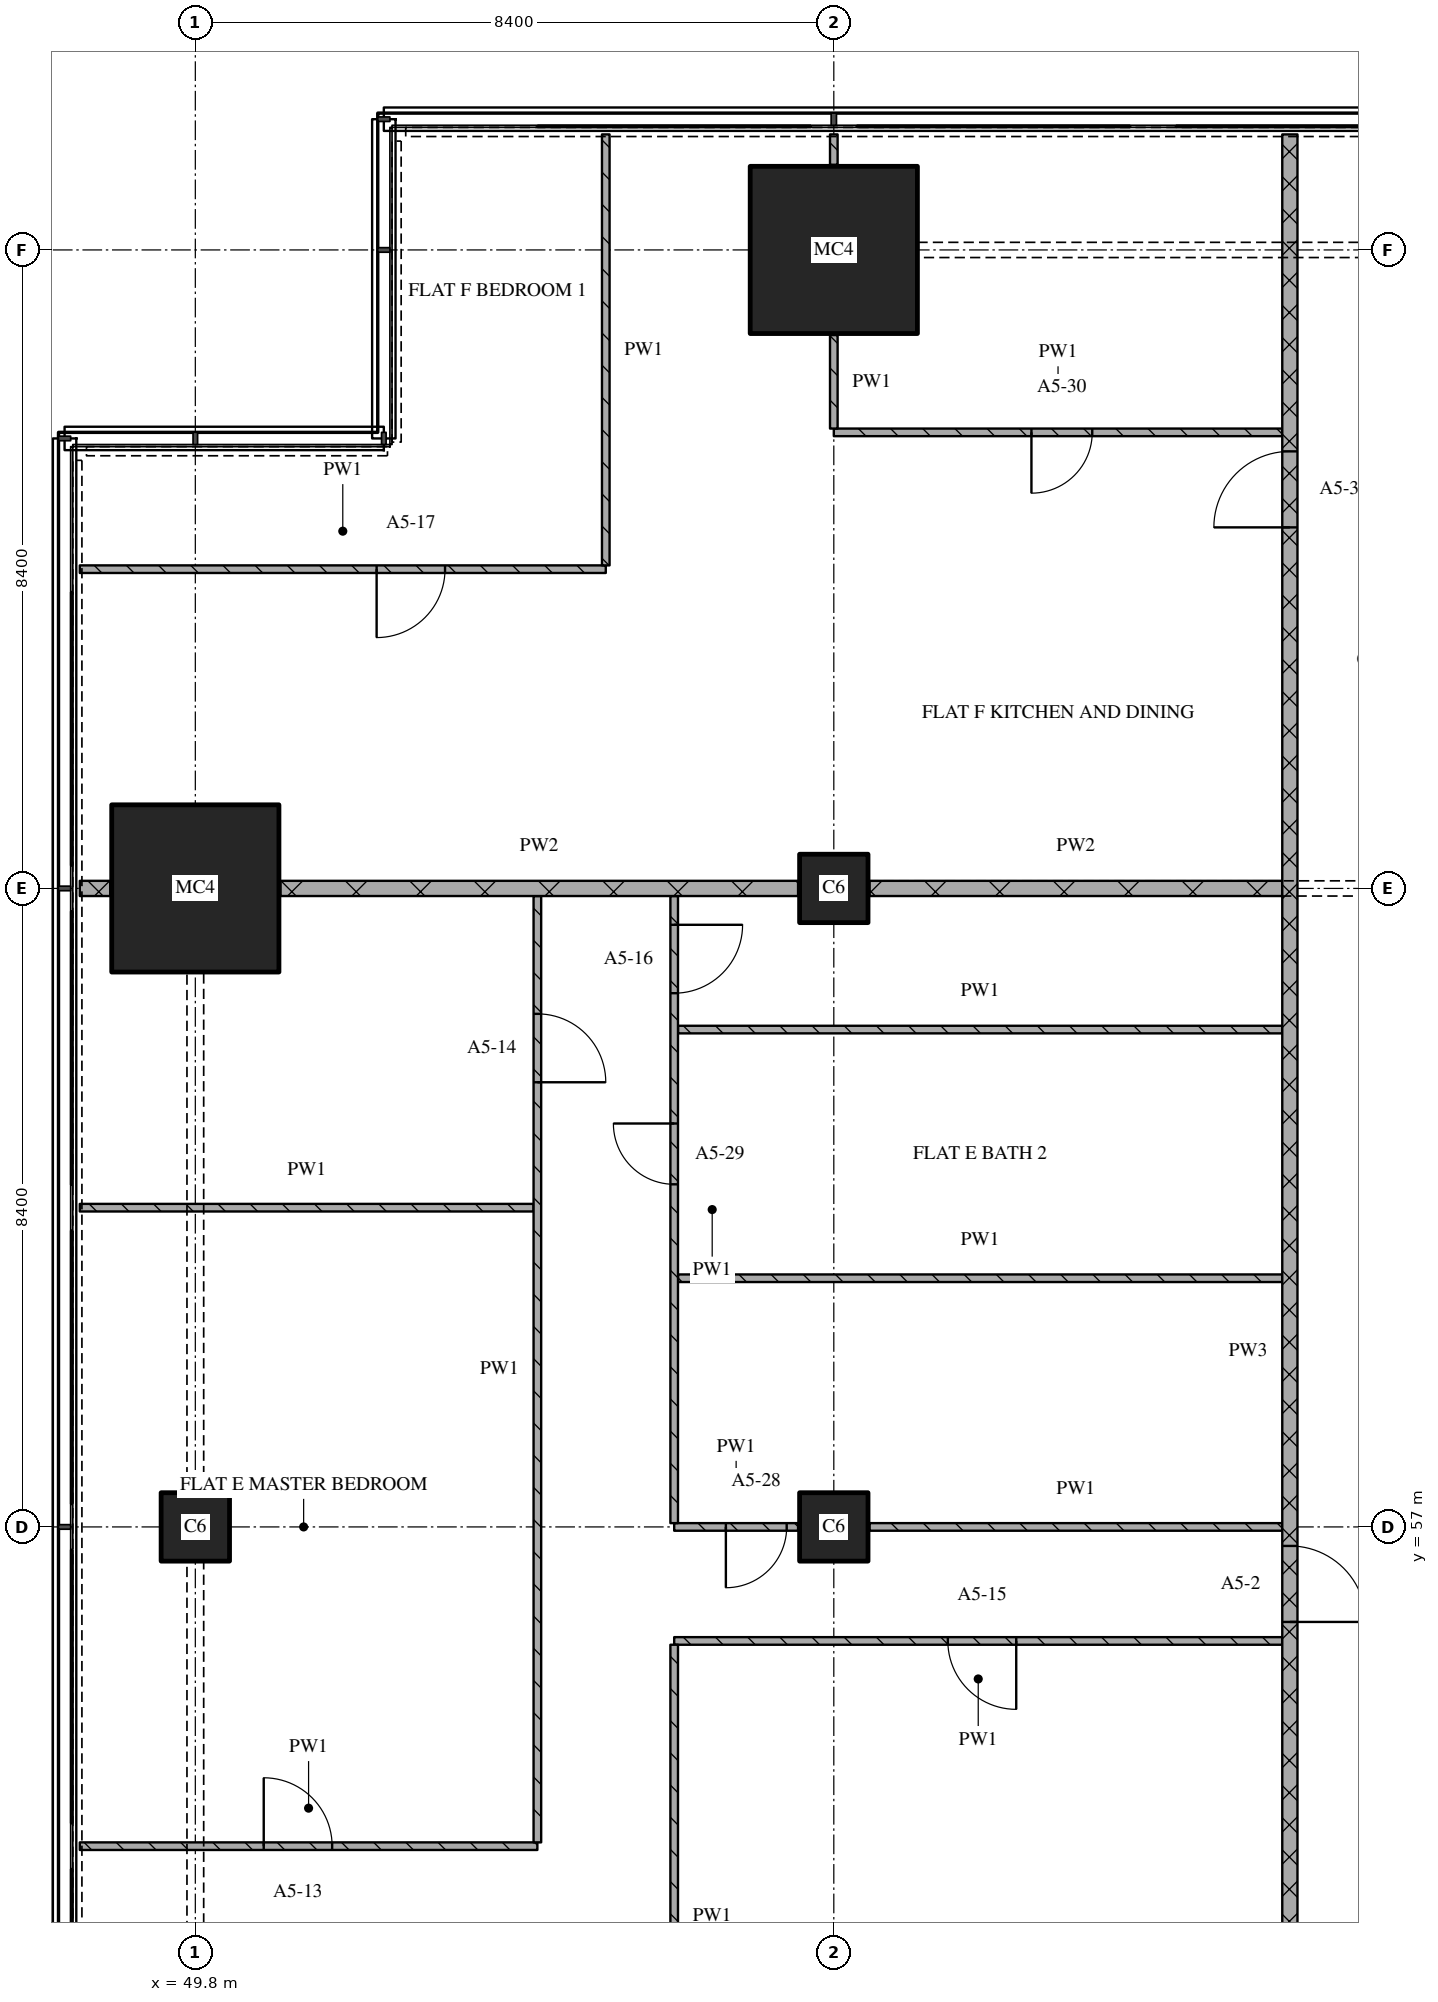
"""IFC4 building model, lengths in metres.
Left out: names, types, materials, properties, quantities, classifications, styles, units other than length and angle.
Written with IfcOpenShell. Run it as: python <this file> out.ifc"""

import sys

from ifc_helpers import new_model, si_unit, direction, frame, frame_2d, origin, origin_2d, place, context, subcontext, project, spatial, rectangle, extrude, element, fill, save


model = new_model("IFC4")
c1 = context("Model", 3, precision=1e-05, world=origin(), true_north=direction((0.0, 1.0)))
c2 = subcontext(c1, "Body", "Model", "MODEL_VIEW")
j1 = project(units=[si_unit("LENGTHUNIT", "METRE"), si_unit("PLANEANGLEUNIT", "RADIAN")], contexts=[c1])
p1 = place(None, origin())
s1 = spatial("IfcSite", under=j1, at=p1, CompositionType="ELEMENT")
p2 = place(p1, origin())
s2 = spatial("IfcBuilding", under=s1, at=p2, CompositionType="ELEMENT")
p3 = place(p2, frame((0.0, 0.0, 80.4)))
s3 = spatial("IfcBuildingStorey", under=s2, at=p3, CompositionType="ELEMENT", Elevation=80.4)
p4 = place(p3, frame((49.8, 57.0, 0.0), z_axis=(0.0, 0.0, 1.0), x_axis=(1.0, 0.0, 0.0)))
e1 = element("IfcColumn", 1, at=p4, inside=s3, PredefinedType="COLUMN", context=c2, shape_type="SweptSolid", body=[
    extrude(rectangle(XDim=0.9, YDim=0.9, at=origin_2d()), origin(), (0.0, 0.0, 1.0), 3.6),
])
p5 = place(p3, frame((49.8, 65.4, 0.0), z_axis=(0.0, 0.0, 1.0), x_axis=(1.0, 0.0, 0.0)))
e2 = element("IfcColumn", 2, at=p5, inside=s3, PredefinedType="COLUMN", context=c2, shape_type="SweptSolid", body=[
    extrude(rectangle(XDim=2.2, YDim=2.2, at=origin_2d()), origin(), (0.0, 0.0, 1.0), 3.6),
])
for number, where, z_axis, x_axis in (
    (3, (58.2, 57.0, 0.0), (0.0, 0.0, 1.0), (1.0, 0.0, 0.0)),
    (4, (58.2, 65.4, 0.0), (0.0, 0.0, 1.0), (1.0, 0.0, 0.0)),
):
    element("IfcColumn", number, at=place(p3, frame(where, z_axis=z_axis, x_axis=x_axis)), inside=s3, PredefinedType="COLUMN", context=c2, shape_type="SweptSolid", body=[
        extrude(rectangle(XDim=0.9, YDim=0.9, at=origin_2d()), origin(), (0.0, 0.0, 1.0), 3.6),
    ])
p6 = place(p3, frame((58.2, 73.8, 0.0), z_axis=(0.0, 0.0, 1.0), x_axis=(1.0, 0.0, 0.0)))
e5 = element("IfcColumn", 5, at=p6, inside=s3, PredefinedType="COLUMN", context=c2, shape_type="SweptSolid", body=[
    extrude(rectangle(XDim=2.2, YDim=2.2, at=origin_2d()), origin(), (0.0, 0.0, 1.0), 3.6),
])
p7 = place(p3, frame((48.28, 52.8, 0.0), z_axis=(0.0, 0.0, 1.0), x_axis=(1.0, 0.0, 0.0)))
e6 = element("IfcWall", 6, at=p7, inside=s3, PredefinedType="PARTITIONING", context=c2, shape_type="SweptSolid", body=[
    extrude(rectangle(XDim=6.02, YDim=0.1, at=frame_2d((3.01, 0.0))), origin(), (0.0, 0.0, 1.0), 3.3),
])
p8 = place(p7, frame((2.42, 0.0, 0.0)))
e7 = element("IfcOpeningElement", 7, at=p8, cuts=e6, PredefinedType="OPENING", context=c2, shape_type="SweptSolid", body=[
    extrude(rectangle(XDim=0.9, YDim=2.1, at=frame_2d((0.45, 1.05))), frame((0.0, 0.06, 0.0), z_axis=(0.0, -1.0, 0.0), x_axis=(1.0, 0.0, 0.0)), (0.0, 0.0, 1.0), 0.12),
])
p9 = place(p3, frame((64.1, 55.5, 0.0), z_axis=(0.0, 0.0, 1.0), x_axis=(-1.0, 0.0, 0.0)))
e8 = element("IfcWall", 8, at=p9, inside=s3, PredefinedType="PARTITIONING", context=c2, shape_type="SweptSolid", body=[
    extrude(rectangle(XDim=8.0, YDim=0.1, at=frame_2d((4.0, 0.0))), origin(), (0.0, 0.0, 1.0), 3.3),
])
p10 = place(p9, frame((3.5, 0.0, 0.0)))
e9 = element("IfcOpeningElement", 9, at=p10, cuts=e8, PredefinedType="OPENING", context=c2, shape_type="SweptSolid", body=[
    extrude(rectangle(XDim=0.9, YDim=2.1, at=frame_2d((0.45, 1.05))), frame((0.0, 0.06, 0.0), z_axis=(0.0, -1.0, 0.0), x_axis=(1.0, 0.0, 0.0)), (0.0, 0.0, 1.0), 0.12),
])
p11 = place(p3, frame((56.1, 57.0, 0.0), z_axis=(0.0, 0.0, 1.0), x_axis=(1.0, 0.0, 0.0)))
e10 = element("IfcWall", 10, at=p11, inside=s3, PredefinedType="PARTITIONING", context=c2, shape_type="SweptSolid", body=[
    extrude(rectangle(XDim=1.63, YDim=0.1, at=frame_2d((0.815, 0.0))), origin(), (0.0, 0.0, 1.0), 3.3),
])
p12 = place(p11, frame((0.68, 0.0, 0.0)))
e11 = element("IfcOpeningElement", 11, at=p12, cuts=e10, PredefinedType="OPENING", context=c2, shape_type="SweptSolid", body=[
    extrude(rectangle(XDim=0.8, YDim=2.1, at=frame_2d((0.4, 1.05))), frame((0.0, 0.06, 0.0), z_axis=(0.0, -1.0, 0.0), x_axis=(1.0, 0.0, 0.0)), (0.0, 0.0, 1.0), 0.12),
])
p13 = place(p3, frame((58.67, 57.0, 0.0), z_axis=(0.0, 0.0, 1.0), x_axis=(1.0, 0.0, 0.0)))
e12 = element("IfcWall", 12, at=p13, inside=s3, PredefinedType="PARTITIONING", context=c2, shape_type="SweptSolid", body=[
    extrude(rectangle(XDim=5.43, YDim=0.1, at=frame_2d((2.715, 0.0))), origin(), (0.0, 0.0, 1.0), 3.3),
])
p14 = place(p3, frame((56.15, 60.271, 0.0), z_axis=(0.0, 0.0, 1.0), x_axis=(1.0, 0.0, 0.0)))
e13 = element("IfcWall", 13, at=p14, inside=s3, PredefinedType="PARTITIONING", context=c2, shape_type="SweptSolid", body=[
    extrude(rectangle(XDim=7.95, YDim=0.1, at=frame_2d((3.975, 0.0))), origin(), (0.0, 0.0, 1.0), 3.3),
])
p15 = place(p3, frame((48.28, 61.2, 0.0), z_axis=(0.0, 0.0, 1.0), x_axis=(1.0, 0.0, 0.0)))
e14 = element("IfcWall", 14, at=p15, inside=s3, PredefinedType="PARTITIONING", context=c2, shape_type="SweptSolid", body=[
    extrude(rectangle(XDim=5.97, YDim=0.1, at=frame_2d((2.985, 0.0))), origin(), (0.0, 0.0, 1.0), 3.3),
])
p16 = place(p3, frame((56.15, 63.543, 0.0), z_axis=(0.0, 0.0, 1.0), x_axis=(1.0, 0.0, 0.0)))
e15 = element("IfcWall", 15, at=p16, inside=s3, PredefinedType="PARTITIONING", context=c2, shape_type="SweptSolid", body=[
    extrude(rectangle(XDim=7.95, YDim=0.1, at=frame_2d((3.975, 0.0))), origin(), (0.0, 0.0, 1.0), 3.3),
])
p17 = place(p3, frame((48.28, 65.4, 0.0), z_axis=(0.0, 0.0, 1.0), x_axis=(1.0, 0.0, 0.0)))
e16 = element("IfcWall", 16, at=p17, inside=s3, PredefinedType="PARTITIONING", context=c2, shape_type="SweptSolid", body=[
    extrude(rectangle(XDim=0.4, YDim=0.2, at=frame_2d((0.2, 0.0))), origin(), (0.0, 0.0, 1.0), 3.3),
])
p18 = place(p3, frame((50.92, 65.4, 0.0), z_axis=(0.0, 0.0, 1.0), x_axis=(1.0, 0.0, 0.0)))
e17 = element("IfcWall", 17, at=p18, inside=s3, PredefinedType="PARTITIONING", context=c2, shape_type="SweptSolid", body=[
    extrude(rectangle(XDim=6.81, YDim=0.2, at=frame_2d((3.405, 0.0))), origin(), (0.0, 0.0, 1.0), 2.41),
])
p19 = place(p3, frame((58.67, 65.4, 0.0), z_axis=(0.0, 0.0, 1.0), x_axis=(1.0, 0.0, 0.0)))
e18 = element("IfcWall", 18, at=p19, inside=s3, PredefinedType="PARTITIONING", context=c2, shape_type="SweptSolid", body=[
    extrude(rectangle(XDim=5.43, YDim=0.2, at=frame_2d((2.715, 0.0))), origin(), (0.0, 0.0, 1.0), 2.8),
])
p20 = place(p3, frame((48.28, 69.6, 0.0), z_axis=(0.0, 0.0, 1.0), x_axis=(1.0, 0.0, 0.0)))
e19 = element("IfcWall", 19, at=p20, inside=s3, PredefinedType="PARTITIONING", context=c2, shape_type="SweptSolid", body=[
    extrude(rectangle(XDim=6.92, YDim=0.1, at=frame_2d((3.46, 0.0))), origin(), (0.0, 0.0, 1.0), 3.3),
])
p21 = place(p20, frame((3.905, 0.0, 0.0)))
e20 = element("IfcOpeningElement", 20, at=p21, cuts=e19, PredefinedType="OPENING", context=c2, shape_type="SweptSolid", body=[
    extrude(rectangle(XDim=0.9, YDim=2.1, at=frame_2d((0.45, 1.05))), frame((0.0, 0.06, 0.0), z_axis=(0.0, -1.0, 0.0), x_axis=(1.0, 0.0, 0.0)), (0.0, 0.0, 1.0), 0.12),
])
p22 = place(p3, frame((58.2, 71.4, 0.0), z_axis=(0.0, 0.0, 1.0), x_axis=(1.0, 0.0, 0.0)))
e21 = element("IfcWall", 21, at=p22, inside=s3, PredefinedType="PARTITIONING", context=c2, shape_type="SweptSolid", body=[
    extrude(rectangle(XDim=5.9, YDim=0.1, at=frame_2d((2.95, 0.0))), origin(), (0.0, 0.0, 1.0), 3.3),
])
p23 = place(p22, frame((2.6, 0.0, 0.0)))
e22 = element("IfcOpeningElement", 22, at=p23, cuts=e21, PredefinedType="OPENING", context=c2, shape_type="SweptSolid", body=[
    extrude(rectangle(XDim=0.8, YDim=2.1, at=frame_2d((0.4, 1.05))), frame((0.0, 0.06, 0.0), z_axis=(0.0, -1.0, 0.0), x_axis=(1.0, 0.0, 0.0)), (0.0, 0.0, 1.0), 0.12),
])
p24 = place(p3, frame((54.3, 52.85, 0.0), z_axis=(0.0, 0.0, 1.0), x_axis=(0.0, 1.0, 0.0)))
e23 = element("IfcWall", 23, at=p24, inside=s3, PredefinedType="PARTITIONING", context=c2, shape_type="SweptSolid", body=[
    extrude(rectangle(XDim=12.45, YDim=0.1, at=frame_2d((6.225, 0.0))), origin(), (0.0, 0.0, 1.0), 3.3),
])
p25 = place(p24, frame((10.0, 0.0, 0.0)))
e24 = element("IfcOpeningElement", 24, at=p25, cuts=e23, PredefinedType="OPENING", context=c2, shape_type="SweptSolid", body=[
    extrude(rectangle(XDim=0.9, YDim=2.1, at=frame_2d((0.45, 1.05))), frame((0.0, 0.06, 0.0), z_axis=(0.0, -1.0, 0.0), x_axis=(1.0, 0.0, 0.0)), (0.0, 0.0, 1.0), 0.12),
])
p26 = place(p3, frame((55.2, 75.32, 0.0), z_axis=(0.0, 0.0, 1.0), x_axis=(0.0, -1.0, 0.0)))
e25 = element("IfcWall", 25, at=p26, inside=s3, PredefinedType="PARTITIONING", context=c2, shape_type="SweptSolid", body=[
    extrude(rectangle(XDim=5.67, YDim=0.1, at=frame_2d((2.835, 0.0))), origin(), (0.0, 0.0, 1.0), 3.3),
])
p27 = place(p3, frame((56.1, 55.45, 0.0), z_axis=(0.0, 0.0, 1.0), x_axis=(0.0, -1.0, 0.0)))
e26 = element("IfcWall", 26, at=p27, inside=s3, PredefinedType="PARTITIONING", context=c2, shape_type="SweptSolid", body=[
    extrude(rectangle(XDim=7.138, YDim=0.1, at=frame_2d((3.569, 0.0))), origin(), (0.0, 0.0, 1.0), 3.3),
])
p28 = place(p3, frame((56.1, 65.3, 0.0), z_axis=(0.0, 0.0, 1.0), x_axis=(0.0, -1.0, 0.0)))
e27 = element("IfcWall", 27, at=p28, inside=s3, PredefinedType="PARTITIONING", context=c2, shape_type="SweptSolid", body=[
    extrude(rectangle(XDim=8.25, YDim=0.1, at=frame_2d((4.125, 0.0))), origin(), (0.0, 0.0, 1.0), 3.3),
])
p29 = place(p28, frame((0.378, 0.0, 0.0)))
e28 = element("IfcOpeningElement", 28, at=p29, cuts=e27, PredefinedType="OPENING", context=c2, shape_type="SweptSolid", body=[
    extrude(rectangle(XDim=0.9, YDim=2.1, at=frame_2d((0.45, 1.05))), frame((0.0, 0.06, 0.0), z_axis=(0.0, -1.0, 0.0), x_axis=(1.0, 0.0, 0.0)), (0.0, 0.0, 1.0), 0.12),
])
p30 = place(p28, frame((2.993, 0.0, 0.0)))
e29 = element("IfcOpeningElement", 29, at=p30, cuts=e27, PredefinedType="OPENING", context=c2, shape_type="SweptSolid", body=[
    extrude(rectangle(XDim=0.8, YDim=2.1, at=frame_2d((0.4, 1.05))), frame((0.0, 0.06, 0.0), z_axis=(0.0, -1.0, 0.0), x_axis=(1.0, 0.0, 0.0)), (0.0, 0.0, 1.0), 0.12),
])
p31 = place(p3, frame((58.2, 72.68, 0.0), z_axis=(0.0, 0.0, 1.0), x_axis=(0.0, -1.0, 0.0)))
e30 = element("IfcWall", 30, at=p31, inside=s3, PredefinedType="PARTITIONING", context=c2, shape_type="SweptSolid", body=[
    extrude(rectangle(XDim=1.23, YDim=0.1, at=frame_2d((0.615, 0.0))), origin(), (0.0, 0.0, 1.0), 3.3),
])
p32 = place(p3, frame((58.2, 75.32, 0.0), z_axis=(0.0, 0.0, 1.0), x_axis=(0.0, -1.0, 0.0)))
e31 = element("IfcWall", 31, at=p32, inside=s3, PredefinedType="PARTITIONING", context=c2, shape_type="SweptSolid", body=[
    extrude(rectangle(XDim=0.4, YDim=0.1, at=frame_2d((0.2, 0.0))), origin(), (0.0, 0.0, 1.0), 3.3),
])
p33 = place(p3, frame((64.2, 43.3, 0.0), z_axis=(0.0, 0.0, 1.0), x_axis=(0.0, 1.0, 0.0)))
e32 = element("IfcWall", 32, at=p33, inside=s3, PredefinedType="PARTITIONING", context=c2, shape_type="SweptSolid", body=[
    extrude(rectangle(XDim=32.02, YDim=0.2, at=frame_2d((16.01, 0.0))), origin(), (0.0, 0.0, 1.0), 3.3),
])
p34 = place(p33, frame((12.45, 0.0, 0.0)))
e33 = element("IfcOpeningElement", 33, at=p34, cuts=e32, PredefinedType="OPENING", context=c2, shape_type="SweptSolid", body=[
    extrude(rectangle(XDim=1.0, YDim=2.1, at=frame_2d((0.5, 1.05))), frame((0.0, 0.11, 0.0), z_axis=(0.0, -1.0, 0.0), x_axis=(1.0, 0.0, 0.0)), (0.0, 0.0, 1.0), 0.22),
])
p35 = place(p33, frame((26.85, 0.0, 0.0)))
e34 = element("IfcOpeningElement", 34, at=p35, cuts=e32, PredefinedType="OPENING", context=c2, shape_type="SweptSolid", body=[
    extrude(rectangle(XDim=1.0, YDim=2.1, at=frame_2d((0.5, 1.05))), frame((0.0, 0.11, 0.0), z_axis=(0.0, -1.0, 0.0), x_axis=(1.0, 0.0, 0.0)), (0.0, 0.0, 1.0), 0.22),
])
p36 = place(p8, origin())
e35 = element("IfcDoor", 35, at=p36, inside=s3, OperationType="SINGLE_SWING_LEFT", PredefinedType="DOOR", context=c2, shape_type="SweptSolid", body=[
    extrude(rectangle(XDim=0.9, YDim=2.1, at=frame_2d((0.45, 1.05))), frame((0.0, 0.025, 0.0), z_axis=(0.0, -1.0, 0.0), x_axis=(1.0, 0.0, 0.0)), (0.0, 0.0, 1.0), 0.05),
])
fill(e7, e35)
p37 = place(p10, origin())
e36 = element("IfcDoor", 36, at=p37, inside=s3, OperationType="SINGLE_SWING_LEFT", PredefinedType="DOOR", context=c2, shape_type="SweptSolid", body=[
    extrude(rectangle(XDim=0.9, YDim=2.1, at=frame_2d((0.45, 1.05))), frame((0.0, 0.025, 0.0), z_axis=(0.0, -1.0, 0.0), x_axis=(1.0, 0.0, 0.0)), (0.0, 0.0, 1.0), 0.05),
])
fill(e9, e36)
p38 = place(p12, origin())
e37 = element("IfcDoor", 37, at=p38, inside=s3, OperationType="SINGLE_SWING_RIGHT", PredefinedType="DOOR", context=c2, shape_type="SweptSolid", body=[
    extrude(rectangle(XDim=0.8, YDim=2.1, at=frame_2d((0.4, 1.05))), frame((0.0, 0.025, 0.0), z_axis=(0.0, -1.0, 0.0), x_axis=(1.0, 0.0, 0.0)), (0.0, 0.0, 1.0), 0.05),
])
fill(e11, e37)
p39 = place(p21, origin())
e38 = element("IfcDoor", 38, at=p39, inside=s3, OperationType="SINGLE_SWING_RIGHT", PredefinedType="DOOR", context=c2, shape_type="SweptSolid", body=[
    extrude(rectangle(XDim=0.9, YDim=2.1, at=frame_2d((0.45, 1.05))), frame((0.0, 0.025, 0.0), z_axis=(0.0, -1.0, 0.0), x_axis=(1.0, 0.0, 0.0)), (0.0, 0.0, 1.0), 0.05),
])
fill(e20, e38)
p40 = place(p23, origin())
e39 = element("IfcDoor", 39, at=p40, inside=s3, OperationType="SINGLE_SWING_RIGHT", PredefinedType="DOOR", context=c2, shape_type="SweptSolid", body=[
    extrude(rectangle(XDim=0.8, YDim=2.1, at=frame_2d((0.4, 1.05))), frame((0.0, 0.025, 0.0), z_axis=(0.0, -1.0, 0.0), x_axis=(1.0, 0.0, 0.0)), (0.0, 0.0, 1.0), 0.05),
])
fill(e22, e39)
p41 = place(p25, origin())
e40 = element("IfcDoor", 40, at=p41, inside=s3, OperationType="SINGLE_SWING_RIGHT", PredefinedType="DOOR", context=c2, shape_type="SweptSolid", body=[
    extrude(rectangle(XDim=0.9, YDim=2.1, at=frame_2d((0.45, 1.05))), frame((0.0, 0.025, 0.0), z_axis=(0.0, -1.0, 0.0), x_axis=(1.0, 0.0, 0.0)), (0.0, 0.0, 1.0), 0.05),
])
fill(e24, e40)
p42 = place(p29, origin())
e41 = element("IfcDoor", 41, at=p42, inside=s3, OperationType="SINGLE_SWING_LEFT", PredefinedType="DOOR", context=c2, shape_type="SweptSolid", body=[
    extrude(rectangle(XDim=0.9, YDim=2.1, at=frame_2d((0.45, 1.05))), frame((0.0, 0.025, 0.0), z_axis=(0.0, -1.0, 0.0), x_axis=(1.0, 0.0, 0.0)), (0.0, 0.0, 1.0), 0.05),
])
fill(e28, e41)
p43 = place(p30, origin())
e42 = element("IfcDoor", 42, at=p43, inside=s3, OperationType="SINGLE_SWING_RIGHT", PredefinedType="DOOR", context=c2, shape_type="SweptSolid", body=[
    extrude(rectangle(XDim=0.8, YDim=2.1, at=frame_2d((0.4, 1.05))), frame((0.0, 0.025, 0.0), z_axis=(0.0, -1.0, 0.0), x_axis=(1.0, 0.0, 0.0)), (0.0, 0.0, 1.0), 0.05),
])
fill(e29, e42)
p44 = place(p34, origin())
e43 = element("IfcDoor", 43, at=p44, inside=s3, OperationType="SINGLE_SWING_RIGHT", PredefinedType="DOOR", context=c2, shape_type="SweptSolid", body=[
    extrude(rectangle(XDim=1.0, YDim=2.1, at=frame_2d((0.5, 1.05))), frame((0.0, 0.025, 0.0), z_axis=(0.0, -1.0, 0.0), x_axis=(1.0, 0.0, 0.0)), (0.0, 0.0, 1.0), 0.05),
])
fill(e33, e43)
p45 = place(p35, origin())
e44 = element("IfcDoor", 44, at=p45, inside=s3, OperationType="SINGLE_SWING_LEFT", PredefinedType="DOOR", context=c2, shape_type="SweptSolid", body=[
    extrude(rectangle(XDim=1.0, YDim=2.1, at=frame_2d((0.5, 1.05))), frame((0.0, 0.025, 0.0), z_axis=(0.0, -1.0, 0.0), x_axis=(1.0, 0.0, 0.0)), (0.0, 0.0, 1.0), 0.05),
])
fill(e34, e44)
save(model, sys.argv[1])
